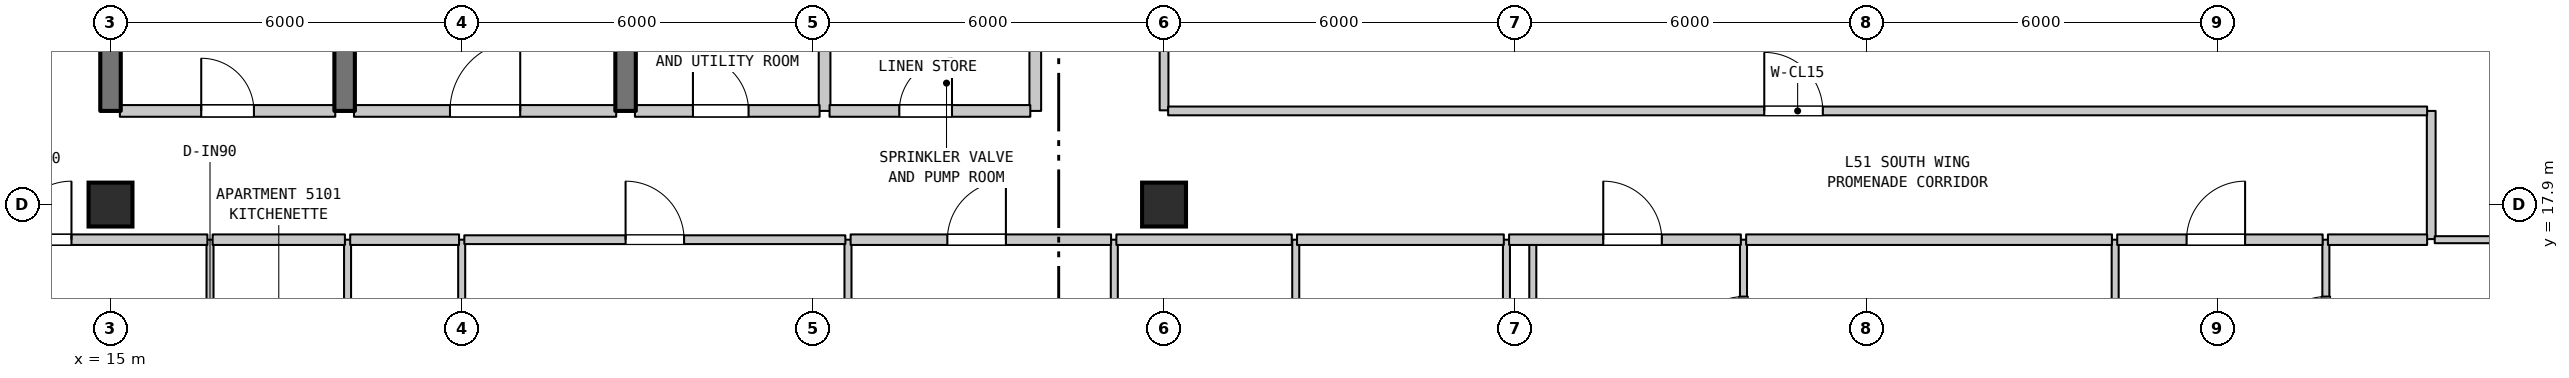
"""IFC4 building model, lengths in metres.
Left out: names, types, materials, properties, quantities, classifications, styles, units other than length and angle.
Written with IfcOpenShell. Run it as: python <this file> out.ifc"""

import sys

from ifc_helpers import new_model, si_unit, direction, frame, frame_2d, origin, origin_2d, place, context, subcontext, project, spatial, rectangle, extrude, element, fill, save


model = new_model("IFC4")
c1 = context("Model", 3, precision=1e-05, world=origin(), true_north=direction((0.0, 1.0)))
c2 = subcontext(c1, "Body", "Model", "MODEL_VIEW")
j1 = project(units=[si_unit("LENGTHUNIT", "METRE"), si_unit("PLANEANGLEUNIT", "RADIAN")], contexts=[c1])
p1 = place(None, origin())
s1 = spatial("IfcSite", under=j1, at=p1, CompositionType="ELEMENT")
p2 = place(p1, origin())
s2 = spatial("IfcBuilding", under=s1, at=p2, CompositionType="ELEMENT")
p3 = place(p2, frame((0.0, 0.0, 206.9)))
s3 = spatial("IfcBuildingStorey", under=s2, at=p3, CompositionType="ELEMENT", Elevation=206.9)
for number, where, z_axis, x_axis in (
    (1, (15.0, 17.9, 0.0), (0.0, 0.0, 1.0), (1.0, 0.0, 0.0)),
    (2, (33.0, 17.9, 0.0), (0.0, 0.0, 1.0), (1.0, 0.0, 0.0)),
):
    element("IfcColumn", number, at=place(p3, frame(where, z_axis=z_axis, x_axis=x_axis)), inside=s3, PredefinedType="COLUMN", context=c2, shape_type="SweptSolid", body=[
        extrude(rectangle(XDim=0.75, YDim=0.75, at=origin_2d()), origin(), (0.0, 0.0, 1.0), 3.7),
    ])
p4 = place(p3, frame((15.0, 19.5, 0.0), z_axis=(0.0, 0.0, 1.0), x_axis=(0.0, 1.0, 0.0)))
e3 = element("IfcWall", 3, at=p4, inside=s3, PredefinedType="SHEAR", context=c2, shape_type="SweptSolid", body=[
    extrude(rectangle(XDim=3.2, YDim=0.35, at=frame_2d((1.6, 0.0))), origin(), (0.0, 0.0, 1.0), 3.39),
])
p5 = place(p3, frame((16.7, 14.1, 0.0), z_axis=(0.0, 0.0, 1.0), x_axis=(0.0, 1.0, 0.0)))
e4 = element("IfcWall", 4, at=p5, inside=s3, PredefinedType="PARTITIONING", context=c2, shape_type="SweptSolid", body=[
    extrude(rectangle(XDim=3.2, YDim=0.12, at=frame_2d((1.6, 0.0))), origin(), (0.0, 0.0, 1.0), 3.39),
])
p6 = place(p5, frame((1.15, 0.0, 0.0)))
e5 = element("IfcOpeningElement", 5, at=p6, cuts=e4, PredefinedType="OPENING", context=c2, shape_type="SweptSolid", body=[
    extrude(rectangle(XDim=0.9, YDim=2.15, at=frame_2d((0.45, 1.075))), frame((0.0, 0.07, 0.0), z_axis=(0.0, -1.0, 0.0), x_axis=(1.0, 0.0, 0.0)), (0.0, 0.0, 1.0), 0.14),
])
p7 = place(p3, frame((19.0, 19.5, 0.0), z_axis=(0.0, 0.0, 1.0), x_axis=(0.0, 1.0, 0.0)))
e6 = element("IfcWall", 6, at=p7, inside=s3, PredefinedType="SHEAR", context=c2, shape_type="SweptSolid", body=[
    extrude(rectangle(XDim=3.2, YDim=0.35, at=frame_2d((1.6, 0.0))), origin(), (0.0, 0.0, 1.0), 3.39),
])
p8 = place(p3, frame((19.05, 14.1, 0.0), z_axis=(0.0, 0.0, 1.0), x_axis=(0.0, 1.0, 0.0)))
e7 = element("IfcWall", 7, at=p8, inside=s3, PredefinedType="PARTITIONING", context=c2, shape_type="SweptSolid", body=[
    extrude(rectangle(XDim=3.2, YDim=0.12, at=frame_2d((1.6, 0.0))), origin(), (0.0, 0.0, 1.0), 3.39),
])
p9 = place(p3, frame((21.0, 6.71, 0.0), z_axis=(0.0, 0.0, 1.0), x_axis=(0.0, 1.0, 0.0)))
e8 = element("IfcWall", 8, at=p9, inside=s3, PredefinedType="PARTITIONING", context=c2, shape_type="SweptSolid", body=[
    extrude(rectangle(XDim=10.59, YDim=0.12, at=frame_2d((5.295, 0.0))), origin(), (0.0, 0.0, 1.0), 3.39),
])
p10 = place(p3, frame((23.8, 19.5, 0.0), z_axis=(0.0, 0.0, 1.0), x_axis=(0.0, 1.0, 0.0)))
e9 = element("IfcWall", 9, at=p10, inside=s3, PredefinedType="SHEAR", context=c2, shape_type="SweptSolid", body=[
    extrude(rectangle(XDim=3.2, YDim=0.35, at=frame_2d((1.6, 0.0))), origin(), (0.0, 0.0, 1.0), 3.39),
])
p11 = place(p3, frame((27.2, 19.5, 0.0), z_axis=(0.0, 0.0, 1.0), x_axis=(0.0, 1.0, 0.0)))
e10 = element("IfcWall", 10, at=p11, inside=s3, PredefinedType="STANDARD", context=c2, shape_type="SweptSolid", body=[
    extrude(rectangle(XDim=1.6, YDim=0.2, at=frame_2d((0.8, 0.0))), origin(), (0.0, 0.0, 1.0), 3.39),
])
p12 = place(p3, frame((27.6, 0.71, 0.0), z_axis=(0.0, 0.0, 1.0), x_axis=(0.0, 1.0, 0.0)))
e11 = element("IfcWall", 11, at=p12, inside=s3, PredefinedType="PARTITIONING", context=c2, shape_type="SweptSolid", body=[
    extrude(rectangle(XDim=16.59, YDim=0.12, at=frame_2d((8.295, 0.0))), origin(), (0.0, 0.0, 1.0), 3.39),
])
p13 = place(p3, frame((30.8, 19.5, 0.0), z_axis=(0.0, 0.0, 1.0), x_axis=(0.0, 1.0, 0.0)))
e12 = element("IfcWall", 12, at=p13, inside=s3, PredefinedType="STANDARD", context=c2, shape_type="SweptSolid", body=[
    extrude(rectangle(XDim=1.6, YDim=0.2, at=frame_2d((0.8, 0.0))), origin(), (0.0, 0.0, 1.0), 3.39),
])
p14 = place(p3, frame((32.15, 11.15, 0.0), z_axis=(0.0, 0.0, 1.0), x_axis=(0.0, 1.0, 0.0)))
e13 = element("IfcWall", 13, at=p14, inside=s3, PredefinedType="PARTITIONING", context=c2, shape_type="SweptSolid", body=[
    extrude(rectangle(XDim=6.15, YDim=0.12, at=frame_2d((3.075, 0.0))), origin(), (0.0, 0.0, 1.0), 3.39),
])
p15 = place(p3, frame((33.0, 19.51, 0.0), z_axis=(0.0, 0.0, 1.0), x_axis=(0.0, 1.0, 0.0)))
e14 = element("IfcWall", 14, at=p15, inside=s3, PredefinedType="STANDARD", context=c2, shape_type="SweptSolid", body=[
    extrude(rectangle(XDim=5.35, YDim=0.15, at=frame_2d((2.675, 0.0))), origin(), (0.0, 0.0, 1.0), 2.99),
])
p16 = place(p15, frame((1.534, 0.0, 0.0)))
e15 = element("IfcOpeningElement", 15, at=p16, cuts=e14, PredefinedType="OPENING", context=c2, shape_type="SweptSolid", body=[
    extrude(rectangle(XDim=1.0, YDim=2.15, at=frame_2d((0.5, 1.075))), frame((0.0, 0.085, 0.0), z_axis=(0.0, -1.0, 0.0), x_axis=(1.0, 0.0, 0.0)), (0.0, 0.0, 1.0), 0.17),
])
for number, where, z_axis, x_axis in (
    (16, (35.25, 11.15, 0.0), (0.0, 0.0, 1.0), (0.0, 1.0, 0.0)),
    (17, (38.85, 11.15, 0.0), (0.0, 0.0, 1.0), (0.0, 1.0, 0.0)),
):
    element("IfcWall", number, at=place(p3, frame(where, z_axis=z_axis, x_axis=x_axis)), inside=s3, PredefinedType="PARTITIONING", context=c2, shape_type="SweptSolid", body=[
        extrude(rectangle(XDim=6.15, YDim=0.12, at=frame_2d((3.075, 0.0))), origin(), (0.0, 0.0, 1.0), 3.39),
    ])
p17 = place(p3, frame((39.3, 0.71, 0.0), z_axis=(0.0, 0.0, 1.0), x_axis=(0.0, 1.0, 0.0)))
e18 = element("IfcWall", 18, at=p17, inside=s3, PredefinedType="PARTITIONING", context=c2, shape_type="SweptSolid", body=[
    extrude(rectangle(XDim=16.59, YDim=0.12, at=frame_2d((8.295, 0.0))), origin(), (0.0, 0.0, 1.0), 3.39),
])
p18 = place(p3, frame((42.9, 14.6, 0.0), z_axis=(0.0, 0.0, 1.0), x_axis=(0.0, 1.0, 0.0)))
e19 = element("IfcWall", 19, at=p18, inside=s3, PredefinedType="PARTITIONING", context=c2, shape_type="SweptSolid", body=[
    extrude(rectangle(XDim=2.7, YDim=0.12, at=frame_2d((1.35, 0.0))), origin(), (0.0, 0.0, 1.0), 3.39),
])
p19 = place(p18, frame((0.828, 0.0, 0.0)))
e20 = element("IfcOpeningElement", 20, at=p19, cuts=e19, PredefinedType="OPENING", context=c2, shape_type="SweptSolid", body=[
    extrude(rectangle(XDim=0.9, YDim=2.1, at=frame_2d((0.45, 1.05))), frame((0.0, 0.07, 0.0), z_axis=(0.0, -1.0, 0.0), x_axis=(1.0, 0.0, 0.0)), (0.0, 0.0, 1.0), 0.14),
])
p20 = place(p3, frame((49.25, 14.6, 0.0), z_axis=(0.0, 0.0, 1.0), x_axis=(0.0, 1.0, 0.0)))
e21 = element("IfcWall", 21, at=p20, inside=s3, PredefinedType="PARTITIONING", context=c2, shape_type="SweptSolid", body=[
    extrude(rectangle(XDim=2.7, YDim=0.12, at=frame_2d((1.35, 0.0))), origin(), (0.0, 0.0, 1.0), 3.39),
])
p21 = place(p3, frame((52.85, 14.6, 0.0), z_axis=(0.0, 0.0, 1.0), x_axis=(0.0, 1.0, 0.0)))
e22 = element("IfcWall", 22, at=p21, inside=s3, PredefinedType="PARTITIONING", context=c2, shape_type="SweptSolid", body=[
    extrude(rectangle(XDim=2.7, YDim=0.12, at=frame_2d((1.35, 0.0))), origin(), (0.0, 0.0, 1.0), 3.39),
])
p22 = place(p21, frame((0.828, 0.0, 0.0)))
e23 = element("IfcOpeningElement", 23, at=p22, cuts=e22, PredefinedType="OPENING", context=c2, shape_type="SweptSolid", body=[
    extrude(rectangle(XDim=0.9, YDim=2.1, at=frame_2d((0.45, 1.05))), frame((0.0, 0.07, 0.0), z_axis=(0.0, -1.0, 0.0), x_axis=(1.0, 0.0, 0.0)), (0.0, 0.0, 1.0), 0.14),
])
p23 = place(p3, frame((54.65, 17.31, 0.0), z_axis=(0.0, 0.0, 1.0), x_axis=(0.0, 1.0, 0.0)))
e24 = element("IfcWall", 24, at=p23, inside=s3, PredefinedType="STANDARD", context=c2, shape_type="SweptSolid", body=[
    extrude(rectangle(XDim=2.19, YDim=0.15, at=frame_2d((1.095, 0.0))), origin(), (0.0, 0.0, 1.0), 3.39),
])
p24 = place(p3, frame((12.875, 17.3, 0.0), z_axis=(0.0, 0.0, 1.0), x_axis=(1.0, 0.0, 0.0)))
e25 = element("IfcWall", 25, at=p24, inside=s3, PredefinedType="STANDARD", context=c2, shape_type="SweptSolid", body=[
    extrude(rectangle(XDim=3.78, YDim=0.18, at=frame_2d((1.89, 0.0))), origin(), (0.0, 0.0, 1.0), 3.39),
])
p25 = place(p24, frame((0.458, 0.0, 0.0)))
e26 = element("IfcOpeningElement", 26, at=p25, cuts=e25, PredefinedType="OPENING", context=c2, shape_type="SweptSolid", body=[
    extrude(rectangle(XDim=1.0, YDim=2.15, at=frame_2d((0.5, 1.075))), frame((0.0, 0.1, 0.0), z_axis=(0.0, -1.0, 0.0), x_axis=(1.0, 0.0, 0.0)), (0.0, 0.0, 1.0), 0.2),
])
p26 = place(p3, frame((16.745, 17.3, 0.0), z_axis=(0.0, 0.0, 1.0), x_axis=(1.0, 0.0, 0.0)))
e27 = element("IfcWall", 27, at=p26, inside=s3, PredefinedType="STANDARD", context=c2, shape_type="SweptSolid", body=[
    extrude(rectangle(XDim=2.26, YDim=0.18, at=frame_2d((1.13, 0.0))), origin(), (0.0, 0.0, 1.0), 3.39),
])
p27 = place(p3, frame((19.095, 17.3, 0.0), z_axis=(0.0, 0.0, 1.0), x_axis=(1.0, 0.0, 0.0)))
e28 = element("IfcWall", 28, at=p27, inside=s3, PredefinedType="STANDARD", context=c2, shape_type="SweptSolid", body=[
    extrude(rectangle(XDim=1.86, YDim=0.18, at=frame_2d((0.93, 0.0))), origin(), (0.0, 0.0, 1.0), 3.39),
])
p28 = place(p3, frame((21.045, 17.3, 0.0), z_axis=(0.0, 0.0, 1.0), x_axis=(1.0, 0.0, 0.0)))
e29 = element("IfcWall", 29, at=p28, inside=s3, PredefinedType="STANDARD", context=c2, shape_type="SweptSolid", body=[
    extrude(rectangle(XDim=6.51, YDim=0.15, at=frame_2d((3.255, 0.0))), origin(), (0.0, 0.0, 1.0), 3.39),
])
p29 = place(p28, frame((2.755, 0.0, 0.0)))
e30 = element("IfcOpeningElement", 30, at=p29, cuts=e29, PredefinedType="OPENING", context=c2, shape_type="SweptSolid", body=[
    extrude(rectangle(XDim=1.0, YDim=2.15, at=frame_2d((0.5, 1.075))), frame((0.0, 0.085, 0.0), z_axis=(0.0, -1.0, 0.0), x_axis=(1.0, 0.0, 0.0)), (0.0, 0.0, 1.0), 0.17),
])
p30 = place(p3, frame((27.645, 17.3, 0.0), z_axis=(0.0, 0.0, 1.0), x_axis=(1.0, 0.0, 0.0)))
e31 = element("IfcWall", 31, at=p30, inside=s3, PredefinedType="STANDARD", context=c2, shape_type="SweptSolid", body=[
    extrude(rectangle(XDim=4.45, YDim=0.18, at=frame_2d((2.225, 0.0))), origin(), (0.0, 0.0, 1.0), 3.39),
])
p31 = place(p30, frame((1.653, 0.0, 0.0)))
e32 = element("IfcOpeningElement", 32, at=p31, cuts=e31, PredefinedType="OPENING", context=c2, shape_type="SweptSolid", body=[
    extrude(rectangle(XDim=1.0, YDim=2.15, at=frame_2d((0.5, 1.075))), frame((0.0, 0.1, 0.0), z_axis=(0.0, -1.0, 0.0), x_axis=(1.0, 0.0, 0.0)), (0.0, 0.0, 1.0), 0.2),
])
p32 = place(p3, frame((32.185, 17.3, 0.0), z_axis=(0.0, 0.0, 1.0), x_axis=(1.0, 0.0, 0.0)))
e33 = element("IfcWall", 33, at=p32, inside=s3, PredefinedType="STANDARD", context=c2, shape_type="SweptSolid", body=[
    extrude(rectangle(XDim=2.997, YDim=0.18, at=frame_2d((1.499, 0.0))), origin(), (0.0, 0.0, 1.0), 3.39),
])
p33 = place(p3, frame((35.272, 17.3, 0.0), z_axis=(0.0, 0.0, 1.0), x_axis=(1.0, 0.0, 0.0)))
e34 = element("IfcWall", 34, at=p33, inside=s3, PredefinedType="STANDARD", context=c2, shape_type="SweptSolid", body=[
    extrude(rectangle(XDim=3.533, YDim=0.18, at=frame_2d((1.767, 0.0))), origin(), (0.0, 0.0, 1.0), 3.39),
])
p34 = place(p3, frame((38.895, 17.3, 0.0), z_axis=(0.0, 0.0, 1.0), x_axis=(1.0, 0.0, 0.0)))
e35 = element("IfcWall", 35, at=p34, inside=s3, PredefinedType="STANDARD", context=c2, shape_type="SweptSolid", body=[
    extrude(rectangle(XDim=3.96, YDim=0.18, at=frame_2d((1.98, 0.0))), origin(), (0.0, 0.0, 1.0), 3.39),
])
p35 = place(p34, frame((1.609, 0.0, 0.0)))
e36 = element("IfcOpeningElement", 36, at=p35, cuts=e35, PredefinedType="OPENING", context=c2, shape_type="SweptSolid", body=[
    extrude(rectangle(XDim=1.0, YDim=2.15, at=frame_2d((0.5, 1.075))), frame((0.0, 0.1, 0.0), z_axis=(0.0, -1.0, 0.0), x_axis=(1.0, 0.0, 0.0)), (0.0, 0.0, 1.0), 0.2),
])
p36 = place(p3, frame((42.945, 17.3, 0.0), z_axis=(0.0, 0.0, 1.0), x_axis=(1.0, 0.0, 0.0)))
e37 = element("IfcWall", 37, at=p36, inside=s3, PredefinedType="STANDARD", context=c2, shape_type="SweptSolid", body=[
    extrude(rectangle(XDim=6.25, YDim=0.18, at=frame_2d((3.125, 0.0))), origin(), (0.0, 0.0, 1.0), 3.39),
])
p37 = place(p3, frame((49.285, 17.3, 0.0), z_axis=(0.0, 0.0, 1.0), x_axis=(1.0, 0.0, 0.0)))
e38 = element("IfcWall", 38, at=p37, inside=s3, PredefinedType="STANDARD", context=c2, shape_type="SweptSolid", body=[
    extrude(rectangle(XDim=3.51, YDim=0.18, at=frame_2d((1.755, 0.0))), origin(), (0.0, 0.0, 1.0), 3.39),
])
p38 = place(p37, frame((1.185, 0.0, 0.0)))
e39 = element("IfcOpeningElement", 39, at=p38, cuts=e38, PredefinedType="OPENING", context=c2, shape_type="SweptSolid", body=[
    extrude(rectangle(XDim=1.0, YDim=2.15, at=frame_2d((0.5, 1.075))), frame((0.0, 0.1, 0.0), z_axis=(0.0, -1.0, 0.0), x_axis=(1.0, 0.0, 0.0)), (0.0, 0.0, 1.0), 0.2),
])
p39 = place(p3, frame((52.885, 17.3, 0.0), z_axis=(0.0, 0.0, 1.0), x_axis=(1.0, 0.0, 0.0)))
e40 = element("IfcWall", 40, at=p39, inside=s3, PredefinedType="STANDARD", context=c2, shape_type="SweptSolid", body=[
    extrude(rectangle(XDim=1.695, YDim=0.18, at=frame_2d((0.848, 0.0))), origin(), (0.0, 0.0, 1.0), 3.39),
])
p40 = place(p3, frame((54.71, 17.3, 0.0), z_axis=(0.0, 0.0, 1.0), x_axis=(1.0, 0.0, 0.0)))
e41 = element("IfcWall", 41, at=p40, inside=s3, PredefinedType="PARTITIONING", context=c2, shape_type="SweptSolid", body=[
    extrude(rectangle(XDim=2.28, YDim=0.12, at=frame_2d((1.14, 0.0))), origin(), (0.0, 0.0, 1.0), 3.39),
])
p41 = place(p3, frame((15.16, 19.5, 0.0), z_axis=(0.0, 0.0, 1.0), x_axis=(1.0, 0.0, 0.0)))
e42 = element("IfcWall", 42, at=p41, inside=s3, PredefinedType="STANDARD", context=c2, shape_type="SweptSolid", body=[
    extrude(rectangle(XDim=3.68, YDim=0.2, at=frame_2d((1.84, 0.0))), origin(), (0.0, 0.0, 1.0), 3.39),
])
p42 = place(p41, frame((1.39, 0.0, 0.0)))
e43 = element("IfcOpeningElement", 43, at=p42, cuts=e42, PredefinedType="OPENING", context=c2, shape_type="SweptSolid", body=[
    extrude(rectangle(XDim=0.9, YDim=2.15, at=frame_2d((0.45, 1.075))), frame((0.0, 0.11, 0.0), z_axis=(0.0, -1.0, 0.0), x_axis=(1.0, 0.0, 0.0)), (0.0, 0.0, 1.0), 0.22),
])
p43 = place(p3, frame((19.16, 19.5, 0.0), z_axis=(0.0, 0.0, 1.0), x_axis=(1.0, 0.0, 0.0)))
e44 = element("IfcWall", 44, at=p43, inside=s3, PredefinedType="STANDARD", context=c2, shape_type="SweptSolid", body=[
    extrude(rectangle(XDim=4.48, YDim=0.2, at=frame_2d((2.24, 0.0))), origin(), (0.0, 0.0, 1.0), 3.39),
])
p44 = place(p43, frame((1.64, 0.0, 0.0)))
e45 = element("IfcOpeningElement", 45, at=p44, cuts=e44, PredefinedType="OPENING", context=c2, shape_type="SweptSolid", body=[
    extrude(rectangle(XDim=1.2, YDim=2.2, at=frame_2d((0.6, 1.1))), frame((0.0, 0.11, 0.0), z_axis=(0.0, -1.0, 0.0), x_axis=(1.0, 0.0, 0.0)), (0.0, 0.0, 1.0), 0.22),
])
p45 = place(p3, frame((23.96, 19.5, 0.0), z_axis=(0.0, 0.0, 1.0), x_axis=(1.0, 0.0, 0.0)))
e46 = element("IfcWall", 46, at=p45, inside=s3, PredefinedType="STANDARD", context=c2, shape_type="SweptSolid", body=[
    extrude(rectangle(XDim=3.155, YDim=0.2, at=frame_2d((1.578, 0.0))), origin(), (0.0, 0.0, 1.0), 3.39),
])
p46 = place(p45, frame((0.991, 0.0, 0.0)))
e47 = element("IfcOpeningElement", 47, at=p46, cuts=e46, PredefinedType="OPENING", context=c2, shape_type="SweptSolid", body=[
    extrude(rectangle(XDim=0.95, YDim=2.15, at=frame_2d((0.475, 1.075))), frame((0.0, 0.11, 0.0), z_axis=(0.0, -1.0, 0.0), x_axis=(1.0, 0.0, 0.0)), (0.0, 0.0, 1.0), 0.22),
])
p47 = place(p3, frame((27.285, 19.5, 0.0), z_axis=(0.0, 0.0, 1.0), x_axis=(1.0, 0.0, 0.0)))
e48 = element("IfcWall", 48, at=p47, inside=s3, PredefinedType="STANDARD", context=c2, shape_type="SweptSolid", body=[
    extrude(rectangle(XDim=3.43, YDim=0.2, at=frame_2d((1.715, 0.0))), origin(), (0.0, 0.0, 1.0), 3.39),
])
p48 = place(p47, frame((1.192, 0.0, 0.0)))
e49 = element("IfcOpeningElement", 49, at=p48, cuts=e48, PredefinedType="OPENING", context=c2, shape_type="SweptSolid", body=[
    extrude(rectangle(XDim=0.9, YDim=2.15, at=frame_2d((0.45, 1.075))), frame((0.0, 0.11, 0.0), z_axis=(0.0, -1.0, 0.0), x_axis=(1.0, 0.0, 0.0)), (0.0, 0.0, 1.0), 0.22),
])
p49 = place(p3, frame((33.07, 19.5, 0.0), z_axis=(0.0, 0.0, 1.0), x_axis=(1.0, 0.0, 0.0)))
e50 = element("IfcWall", 50, at=p49, inside=s3, PredefinedType="STANDARD", context=c2, shape_type="SweptSolid", body=[
    extrude(rectangle(XDim=21.51, YDim=0.15, at=frame_2d((10.755, 0.0))), origin(), (0.0, 0.0, 1.0), 3.39),
])
p50 = place(p49, frame((10.185, 0.0, 0.0)))
e51 = element("IfcOpeningElement", 51, at=p50, cuts=e50, PredefinedType="OPENING", context=c2, shape_type="SweptSolid", body=[
    extrude(rectangle(XDim=1.0, YDim=2.15, at=frame_2d((0.5, 1.075))), frame((0.0, 0.085, 0.0), z_axis=(0.0, -1.0, 0.0), x_axis=(1.0, 0.0, 0.0)), (0.0, 0.0, 1.0), 0.17),
])
p51 = place(p19, origin())
e52 = element("IfcDoor", 52, at=p51, inside=s3, OperationType="SINGLE_SWING_LEFT", PredefinedType="DOOR", context=c2, shape_type="SweptSolid", body=[
    extrude(rectangle(XDim=0.9, YDim=2.1, at=frame_2d((0.45, 1.05))), frame((0.0, 0.025, 0.0), z_axis=(0.0, -1.0, 0.0), x_axis=(1.0, 0.0, 0.0)), (0.0, 0.0, 1.0), 0.05),
])
fill(e20, e52)
p52 = place(p22, origin())
e53 = element("IfcDoor", 53, at=p52, inside=s3, OperationType="SINGLE_SWING_LEFT", PredefinedType="DOOR", context=c2, shape_type="SweptSolid", body=[
    extrude(rectangle(XDim=0.9, YDim=2.1, at=frame_2d((0.45, 1.05))), frame((0.0, 0.025, 0.0), z_axis=(0.0, -1.0, 0.0), x_axis=(1.0, 0.0, 0.0)), (0.0, 0.0, 1.0), 0.05),
])
fill(e23, e53)
p53 = place(p25, origin())
e54 = element("IfcDoor", 54, at=p53, inside=s3, OperationType="SINGLE_SWING_RIGHT", PredefinedType="DOOR", context=c2, shape_type="SweptSolid", body=[
    extrude(rectangle(XDim=1.0, YDim=2.15, at=frame_2d((0.5, 1.075))), frame((0.0, 0.025, 0.0), z_axis=(0.0, -1.0, 0.0), x_axis=(1.0, 0.0, 0.0)), (0.0, 0.0, 1.0), 0.05),
])
fill(e26, e54)
p54 = place(p29, origin())
e55 = element("IfcDoor", 55, at=p54, inside=s3, OperationType="SINGLE_SWING_LEFT", PredefinedType="DOOR", context=c2, shape_type="SweptSolid", body=[
    extrude(rectangle(XDim=1.0, YDim=2.15, at=frame_2d((0.5, 1.075))), frame((0.0, 0.025, 0.0), z_axis=(0.0, -1.0, 0.0), x_axis=(1.0, 0.0, 0.0)), (0.0, 0.0, 1.0), 0.05),
])
fill(e30, e55)
p55 = place(p31, origin())
e56 = element("IfcDoor", 56, at=p55, inside=s3, OperationType="SINGLE_SWING_RIGHT", PredefinedType="DOOR", context=c2, shape_type="SweptSolid", body=[
    extrude(rectangle(XDim=1.0, YDim=2.15, at=frame_2d((0.5, 1.075))), frame((0.0, 0.025, 0.0), z_axis=(0.0, -1.0, 0.0), x_axis=(1.0, 0.0, 0.0)), (0.0, 0.0, 1.0), 0.05),
])
fill(e32, e56)
p56 = place(p35, origin())
e57 = element("IfcDoor", 57, at=p56, inside=s3, OperationType="SINGLE_SWING_LEFT", PredefinedType="DOOR", context=c2, shape_type="SweptSolid", body=[
    extrude(rectangle(XDim=1.0, YDim=2.15, at=frame_2d((0.5, 1.075))), frame((0.0, 0.025, 0.0), z_axis=(0.0, -1.0, 0.0), x_axis=(1.0, 0.0, 0.0)), (0.0, 0.0, 1.0), 0.05),
])
fill(e36, e57)
p57 = place(p38, origin())
e58 = element("IfcDoor", 58, at=p57, inside=s3, OperationType="SINGLE_SWING_RIGHT", PredefinedType="DOOR", context=c2, shape_type="SweptSolid", body=[
    extrude(rectangle(XDim=1.0, YDim=2.15, at=frame_2d((0.5, 1.075))), frame((0.0, 0.025, 0.0), z_axis=(0.0, -1.0, 0.0), x_axis=(1.0, 0.0, 0.0)), (0.0, 0.0, 1.0), 0.05),
])
fill(e39, e58)
p58 = place(p42, origin())
e59 = element("IfcDoor", 59, at=p58, inside=s3, OperationType="SINGLE_SWING_LEFT", PredefinedType="DOOR", context=c2, shape_type="SweptSolid", body=[
    extrude(rectangle(XDim=0.9, YDim=2.15, at=frame_2d((0.45, 1.075))), frame((0.0, 0.025, 0.0), z_axis=(0.0, -1.0, 0.0), x_axis=(1.0, 0.0, 0.0)), (0.0, 0.0, 1.0), 0.05),
])
fill(e43, e59)
p59 = place(p44, origin())
e60 = element("IfcDoor", 60, at=p59, inside=s3, OperationType="SINGLE_SWING_RIGHT", PredefinedType="DOOR", context=c2, shape_type="SweptSolid", body=[
    extrude(rectangle(XDim=1.2, YDim=2.2, at=frame_2d((0.6, 1.1))), frame((0.0, 0.025, 0.0), z_axis=(0.0, -1.0, 0.0), x_axis=(1.0, 0.0, 0.0)), (0.0, 0.0, 1.0), 0.05),
])
fill(e45, e60)
p60 = place(p46, origin())
e61 = element("IfcDoor", 61, at=p60, inside=s3, OperationType="SINGLE_SWING_LEFT", PredefinedType="DOOR", context=c2, shape_type="SweptSolid", body=[
    extrude(rectangle(XDim=0.95, YDim=2.15, at=frame_2d((0.475, 1.075))), frame((0.0, 0.025, 0.0), z_axis=(0.0, -1.0, 0.0), x_axis=(1.0, 0.0, 0.0)), (0.0, 0.0, 1.0), 0.05),
])
fill(e47, e61)
p61 = place(p48, origin())
e62 = element("IfcDoor", 62, at=p61, inside=s3, OperationType="SINGLE_SWING_RIGHT", PredefinedType="DOOR", context=c2, shape_type="SweptSolid", body=[
    extrude(rectangle(XDim=0.9, YDim=2.15, at=frame_2d((0.45, 1.075))), frame((0.0, 0.025, 0.0), z_axis=(0.0, -1.0, 0.0), x_axis=(1.0, 0.0, 0.0)), (0.0, 0.0, 1.0), 0.05),
])
fill(e49, e62)
p62 = place(p50, origin())
e63 = element("IfcDoor", 63, at=p62, inside=s3, OperationType="SINGLE_SWING_LEFT", PredefinedType="DOOR", context=c2, shape_type="SweptSolid", body=[
    extrude(rectangle(XDim=1.0, YDim=2.15, at=frame_2d((0.5, 1.075))), frame((0.0, 0.025, 0.0), z_axis=(0.0, -1.0, 0.0), x_axis=(1.0, 0.0, 0.0)), (0.0, 0.0, 1.0), 0.05),
])
fill(e51, e63)
save(model, sys.argv[1])
